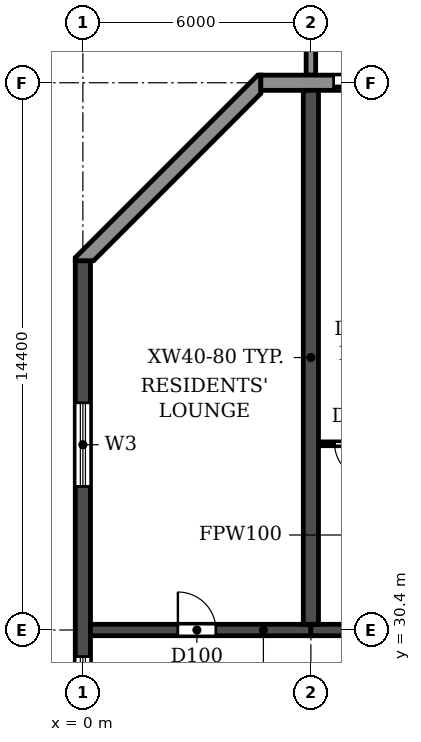
"""IFC4 building model, lengths in metres.
Left out: names, types, materials, properties, quantities, classifications, styles, units other than length and angle.
Written with IfcOpenShell. Run it as: python <this file> out.ifc"""

import sys

from ifc_helpers import new_model, si_unit, direction, frame, frame_2d, origin, place, context, subcontext, project, spatial, polyline, rectangle, outline, extrude, source, transform, mapped, element, fill, save


model = new_model("IFC4")
c1 = context("Model", 3, precision=1e-05, world=origin(), true_north=direction((0.0, 1.0)))
c2 = subcontext(c1, "Body", "Model", "MODEL_VIEW")
j1 = project(units=[si_unit("LENGTHUNIT", "METRE"), si_unit("PLANEANGLEUNIT", "RADIAN")], contexts=[c1])
p1 = place(None, origin())
s1 = spatial("IfcSite", under=j1, at=p1, CompositionType="ELEMENT")
p2 = place(p1, origin())
s2 = spatial("IfcBuilding", under=s1, at=p2, CompositionType="ELEMENT")
p3 = place(p2, frame((0.0, 0.0, 49.8)))
s3 = spatial("IfcBuildingStorey", under=s2, at=p3, CompositionType="ELEMENT", Elevation=49.8)
p4 = place(p3, frame((6.0, 30.55, 0.0), z_axis=(0.0, 0.0, 1.0), x_axis=(0.0, 1.0, 0.0)))
e1 = element("IfcWall", 1, at=p4, inside=s3, PredefinedType="SHEAR", context=c2, shape_type="SweptSolid", body=[
    extrude(rectangle(XDim=14.05, YDim=0.4, at=frame_2d((7.025, 0.0))), origin(), (0.0, 0.0, 1.0), 3.0),
])
p5 = place(p3, frame((0.0, 4.683, 0.0), z_axis=(0.0, 0.0, 1.0), x_axis=(0.0, 1.0, 0.0)))
e2 = element("IfcWall", 2, at=p5, inside=s3, PredefinedType="SHEAR", context=c2, shape_type="SweptSolid", body=[
    extrude(rectangle(XDim=35.434, YDim=0.4, at=frame_2d((17.717, 0.0))), origin(), (0.0, 0.0, 1.0), 3.0),
])
p6 = place(p5, frame((23.817, 0.0, 0.9)))
e3 = element("IfcOpeningElement", 3, at=p6, cuts=e2, PredefinedType="OPENING", context=c2, shape_type="SweptSolid", body=[
    extrude(rectangle(XDim=1.2, YDim=1.5, at=frame_2d((0.6, 0.75))), frame((0.0, 0.21, 0.0), z_axis=(0.0, -1.0, 0.0), x_axis=(1.0, 0.0, 0.0)), (0.0, 0.0, 1.0), 0.42),
])
p7 = place(p5, frame((8.017, 0.0, 0.9)))
e4 = element("IfcOpeningElement", 4, at=p7, cuts=e2, PredefinedType="OPENING", context=c2, shape_type="SweptSolid", body=[
    extrude(rectangle(XDim=1.2, YDim=1.5, at=frame_2d((0.6, 0.75))), frame((0.0, 0.21, 0.0), z_axis=(0.0, -1.0, 0.0), x_axis=(1.0, 0.0, 0.0)), (0.0, 0.0, 1.0), 0.42),
])
p8 = place(p5, frame((15.917, 0.0, 0.9)))
e5 = element("IfcOpeningElement", 5, at=p8, cuts=e2, PredefinedType="OPENING", context=c2, shape_type="SweptSolid", body=[
    extrude(rectangle(XDim=1.2, YDim=1.5, at=frame_2d((0.6, 0.75))), frame((0.0, 0.21, 0.0), z_axis=(0.0, -1.0, 0.0), x_axis=(1.0, 0.0, 0.0)), (0.0, 0.0, 1.0), 0.42),
])
p9 = place(p5, frame((29.493, 0.0, 0.6)))
e6 = element("IfcOpeningElement", 6, at=p9, cuts=e2, PredefinedType="OPENING", context=c2, shape_type="SweptSolid", body=[
    extrude(rectangle(XDim=2.2, YDim=1.8, at=frame_2d((1.1, 0.9))), frame((0.0, 0.21, 0.0), z_axis=(0.0, -1.0, 0.0), x_axis=(1.0, 0.0, 0.0)), (0.0, 0.0, 1.0), 0.42),
])
p10 = place(p5, frame((2.541, 0.0, 0.6)))
e7 = element("IfcOpeningElement", 7, at=p10, cuts=e2, PredefinedType="OPENING", context=c2, shape_type="SweptSolid", body=[
    extrude(rectangle(XDim=2.2, YDim=1.8, at=frame_2d((1.1, 0.9))), frame((0.0, 0.21, 0.0), z_axis=(0.0, -1.0, 0.0), x_axis=(1.0, 0.0, 0.0)), (0.0, 0.0, 1.0), 0.42),
])
p11 = place(p3, frame((0.2, 30.4, 0.0), z_axis=(0.0, 0.0, 1.0), x_axis=(1.0, 0.0, 0.0)))
e8 = element("IfcWall", 8, at=p11, inside=s3, PredefinedType="SHEAR", context=c2, shape_type="SweptSolid", body=[
    extrude(rectangle(XDim=5.8, YDim=0.3, at=frame_2d((2.9, 0.0))), origin(), (0.0, 0.0, 1.0), 2.4),
])
p12 = place(p11, frame((2.3, 0.0, 0.0)))
e9 = element("IfcOpeningElement", 9, at=p12, cuts=e8, PredefinedType="OPENING", context=c2, shape_type="SweptSolid", body=[
    extrude(rectangle(XDim=1.0, YDim=2.1, at=frame_2d((0.5, 1.05))), frame((0.0, 0.16, 0.0), z_axis=(0.0, -1.0, 0.0), x_axis=(1.0, 0.0, 0.0)), (0.0, 0.0, 1.0), 0.32),
])
p13 = place(p3, frame((6.0, 30.4, 0.0), z_axis=(0.0, 0.0, 1.0), x_axis=(1.0, 0.0, 0.0)))
e10 = element("IfcWall", 10, at=p13, inside=s3, PredefinedType="SHEAR", context=c2, shape_type="SweptSolid", body=[
    extrude(rectangle(XDim=6.0, YDim=0.3, at=frame_2d((3.0, 0.0))), origin(), (0.0, 0.0, 1.0), 2.4),
])
p14 = place(p13, frame((2.55, 0.0, 0.0)))
e11 = element("IfcOpeningElement", 11, at=p14, cuts=e10, PredefinedType="OPENING", context=c2, shape_type="SweptSolid", body=[
    extrude(rectangle(XDim=1.0, YDim=2.1, at=frame_2d((0.5, 1.05))), frame((0.0, 0.16, 0.0), z_axis=(0.0, -1.0, 0.0), x_axis=(1.0, 0.0, 0.0)), (0.0, 0.0, 1.0), 0.32),
])
p15 = place(p3, frame((97.317, 44.8, 0.0), z_axis=(0.0, 0.0, 1.0), x_axis=(-1.0, 0.0, 0.0)))
e12 = element("IfcWall", 12, at=p15, inside=s3, PredefinedType="STANDARD", context=c2, shape_type="SweptSolid", body=[
    extrude(rectangle(XDim=92.634, YDim=0.4, at=frame_2d((46.317, 0.0))), origin(), (0.0, 0.0, 1.0), 3.0),
])
p16 = place(p15, frame((88.917, 0.0, 0.0)))
e13 = element("IfcOpeningElement", 13, at=p16, cuts=e12, PredefinedType="OPENING", context=c2, shape_type="SweptSolid", body=[
    extrude(rectangle(XDim=1.8, YDim=2.4, at=frame_2d((0.9, 1.2))), frame((0.0, 0.21, 0.0), z_axis=(0.0, -1.0, 0.0), x_axis=(1.0, 0.0, 0.0)), (0.0, 0.0, 1.0), 0.42),
])
p17 = place(p15, frame((85.717, 0.0, 0.9)))
e14 = element("IfcOpeningElement", 14, at=p17, cuts=e12, PredefinedType="OPENING", context=c2, shape_type="SweptSolid", body=[
    extrude(rectangle(XDim=2.2, YDim=1.5, at=frame_2d((1.1, 0.75))), frame((0.0, 0.21, 0.0), z_axis=(0.0, -1.0, 0.0), x_axis=(1.0, 0.0, 0.0)), (0.0, 0.0, 1.0), 0.42),
])
p18 = place(p15, frame((82.717, 0.0, 0.9)))
e15 = element("IfcOpeningElement", 15, at=p18, cuts=e12, PredefinedType="OPENING", context=c2, shape_type="SweptSolid", body=[
    extrude(rectangle(XDim=2.2, YDim=1.5, at=frame_2d((1.1, 0.75))), frame((0.0, 0.21, 0.0), z_axis=(0.0, -1.0, 0.0), x_axis=(1.0, 0.0, 0.0)), (0.0, 0.0, 1.0), 0.42),
])
p19 = place(p15, frame((79.717, 0.0, 0.9)))
e16 = element("IfcOpeningElement", 16, at=p19, cuts=e12, PredefinedType="OPENING", context=c2, shape_type="SweptSolid", body=[
    extrude(rectangle(XDim=2.2, YDim=1.5, at=frame_2d((1.1, 0.75))), frame((0.0, 0.21, 0.0), z_axis=(0.0, -1.0, 0.0), x_axis=(1.0, 0.0, 0.0)), (0.0, 0.0, 1.0), 0.42),
])
p20 = place(p15, frame((76.717, 0.0, 0.9)))
e17 = element("IfcOpeningElement", 17, at=p20, cuts=e12, PredefinedType="OPENING", context=c2, shape_type="SweptSolid", body=[
    extrude(rectangle(XDim=2.2, YDim=1.5, at=frame_2d((1.1, 0.75))), frame((0.0, 0.21, 0.0), z_axis=(0.0, -1.0, 0.0), x_axis=(1.0, 0.0, 0.0)), (0.0, 0.0, 1.0), 0.42),
])
p21 = place(p15, frame((73.917, 0.0, 0.0)))
e18 = element("IfcOpeningElement", 18, at=p21, cuts=e12, PredefinedType="OPENING", context=c2, shape_type="SweptSolid", body=[
    extrude(rectangle(XDim=1.8, YDim=2.4, at=frame_2d((0.9, 1.2))), frame((0.0, 0.21, 0.0), z_axis=(0.0, -1.0, 0.0), x_axis=(1.0, 0.0, 0.0)), (0.0, 0.0, 1.0), 0.42),
])
p22 = place(p15, frame((70.717, 0.0, 0.9)))
e19 = element("IfcOpeningElement", 19, at=p22, cuts=e12, PredefinedType="OPENING", context=c2, shape_type="SweptSolid", body=[
    extrude(rectangle(XDim=2.2, YDim=1.5, at=frame_2d((1.1, 0.75))), frame((0.0, 0.21, 0.0), z_axis=(0.0, -1.0, 0.0), x_axis=(1.0, 0.0, 0.0)), (0.0, 0.0, 1.0), 0.42),
])
p23 = place(p15, frame((67.717, 0.0, 0.9)))
e20 = element("IfcOpeningElement", 20, at=p23, cuts=e12, PredefinedType="OPENING", context=c2, shape_type="SweptSolid", body=[
    extrude(rectangle(XDim=2.2, YDim=1.5, at=frame_2d((1.1, 0.75))), frame((0.0, 0.21, 0.0), z_axis=(0.0, -1.0, 0.0), x_axis=(1.0, 0.0, 0.0)), (0.0, 0.0, 1.0), 0.42),
])
p24 = place(p15, frame((64.717, 0.0, 0.9)))
e21 = element("IfcOpeningElement", 21, at=p24, cuts=e12, PredefinedType="OPENING", context=c2, shape_type="SweptSolid", body=[
    extrude(rectangle(XDim=2.2, YDim=1.5, at=frame_2d((1.1, 0.75))), frame((0.0, 0.21, 0.0), z_axis=(0.0, -1.0, 0.0), x_axis=(1.0, 0.0, 0.0)), (0.0, 0.0, 1.0), 0.42),
])
p25 = place(p15, frame((61.917, 0.0, 0.0)))
e22 = element("IfcOpeningElement", 22, at=p25, cuts=e12, PredefinedType="OPENING", context=c2, shape_type="SweptSolid", body=[
    extrude(rectangle(XDim=1.8, YDim=2.4, at=frame_2d((0.9, 1.2))), frame((0.0, 0.21, 0.0), z_axis=(0.0, -1.0, 0.0), x_axis=(1.0, 0.0, 0.0)), (0.0, 0.0, 1.0), 0.42),
])
p26 = place(p15, frame((58.717, 0.0, 0.9)))
e23 = element("IfcOpeningElement", 23, at=p26, cuts=e12, PredefinedType="OPENING", context=c2, shape_type="SweptSolid", body=[
    extrude(rectangle(XDim=2.2, YDim=1.5, at=frame_2d((1.1, 0.75))), frame((0.0, 0.21, 0.0), z_axis=(0.0, -1.0, 0.0), x_axis=(1.0, 0.0, 0.0)), (0.0, 0.0, 1.0), 0.42),
])
p27 = place(p15, frame((55.717, 0.0, 0.9)))
e24 = element("IfcOpeningElement", 24, at=p27, cuts=e12, PredefinedType="OPENING", context=c2, shape_type="SweptSolid", body=[
    extrude(rectangle(XDim=2.2, YDim=1.5, at=frame_2d((1.1, 0.75))), frame((0.0, 0.21, 0.0), z_axis=(0.0, -1.0, 0.0), x_axis=(1.0, 0.0, 0.0)), (0.0, 0.0, 1.0), 0.42),
])
p28 = place(p15, frame((52.717, 0.0, 0.9)))
e25 = element("IfcOpeningElement", 25, at=p28, cuts=e12, PredefinedType="OPENING", context=c2, shape_type="SweptSolid", body=[
    extrude(rectangle(XDim=2.2, YDim=1.5, at=frame_2d((1.1, 0.75))), frame((0.0, 0.21, 0.0), z_axis=(0.0, -1.0, 0.0), x_axis=(1.0, 0.0, 0.0)), (0.0, 0.0, 1.0), 0.42),
])
p29 = place(p15, frame((49.917, 0.0, 0.0)))
e26 = element("IfcOpeningElement", 26, at=p29, cuts=e12, PredefinedType="OPENING", context=c2, shape_type="SweptSolid", body=[
    extrude(rectangle(XDim=1.8, YDim=2.4, at=frame_2d((0.9, 1.2))), frame((0.0, 0.21, 0.0), z_axis=(0.0, -1.0, 0.0), x_axis=(1.0, 0.0, 0.0)), (0.0, 0.0, 1.0), 0.42),
])
p30 = place(p15, frame((46.717, 0.0, 0.9)))
e27 = element("IfcOpeningElement", 27, at=p30, cuts=e12, PredefinedType="OPENING", context=c2, shape_type="SweptSolid", body=[
    extrude(rectangle(XDim=2.2, YDim=1.5, at=frame_2d((1.1, 0.75))), frame((0.0, 0.21, 0.0), z_axis=(0.0, -1.0, 0.0), x_axis=(1.0, 0.0, 0.0)), (0.0, 0.0, 1.0), 0.42),
])
p31 = place(p15, frame((43.717, 0.0, 0.9)))
e28 = element("IfcOpeningElement", 28, at=p31, cuts=e12, PredefinedType="OPENING", context=c2, shape_type="SweptSolid", body=[
    extrude(rectangle(XDim=2.2, YDim=1.5, at=frame_2d((1.1, 0.75))), frame((0.0, 0.21, 0.0), z_axis=(0.0, -1.0, 0.0), x_axis=(1.0, 0.0, 0.0)), (0.0, 0.0, 1.0), 0.42),
])
p32 = place(p15, frame((40.717, 0.0, 0.9)))
e29 = element("IfcOpeningElement", 29, at=p32, cuts=e12, PredefinedType="OPENING", context=c2, shape_type="SweptSolid", body=[
    extrude(rectangle(XDim=2.2, YDim=1.5, at=frame_2d((1.1, 0.75))), frame((0.0, 0.21, 0.0), z_axis=(0.0, -1.0, 0.0), x_axis=(1.0, 0.0, 0.0)), (0.0, 0.0, 1.0), 0.42),
])
p33 = place(p15, frame((37.917, 0.0, 0.0)))
e30 = element("IfcOpeningElement", 30, at=p33, cuts=e12, PredefinedType="OPENING", context=c2, shape_type="SweptSolid", body=[
    extrude(rectangle(XDim=1.8, YDim=2.4, at=frame_2d((0.9, 1.2))), frame((0.0, 0.21, 0.0), z_axis=(0.0, -1.0, 0.0), x_axis=(1.0, 0.0, 0.0)), (0.0, 0.0, 1.0), 0.42),
])
p34 = place(p15, frame((34.717, 0.0, 0.9)))
e31 = element("IfcOpeningElement", 31, at=p34, cuts=e12, PredefinedType="OPENING", context=c2, shape_type="SweptSolid", body=[
    extrude(rectangle(XDim=2.2, YDim=1.5, at=frame_2d((1.1, 0.75))), frame((0.0, 0.21, 0.0), z_axis=(0.0, -1.0, 0.0), x_axis=(1.0, 0.0, 0.0)), (0.0, 0.0, 1.0), 0.42),
])
p35 = place(p15, frame((31.717, 0.0, 0.9)))
e32 = element("IfcOpeningElement", 32, at=p35, cuts=e12, PredefinedType="OPENING", context=c2, shape_type="SweptSolid", body=[
    extrude(rectangle(XDim=2.2, YDim=1.5, at=frame_2d((1.1, 0.75))), frame((0.0, 0.21, 0.0), z_axis=(0.0, -1.0, 0.0), x_axis=(1.0, 0.0, 0.0)), (0.0, 0.0, 1.0), 0.42),
])
p36 = place(p15, frame((28.717, 0.0, 0.9)))
e33 = element("IfcOpeningElement", 33, at=p36, cuts=e12, PredefinedType="OPENING", context=c2, shape_type="SweptSolid", body=[
    extrude(rectangle(XDim=2.2, YDim=1.5, at=frame_2d((1.1, 0.75))), frame((0.0, 0.21, 0.0), z_axis=(0.0, -1.0, 0.0), x_axis=(1.0, 0.0, 0.0)), (0.0, 0.0, 1.0), 0.42),
])
p37 = place(p15, frame((25.917, 0.0, 0.0)))
e34 = element("IfcOpeningElement", 34, at=p37, cuts=e12, PredefinedType="OPENING", context=c2, shape_type="SweptSolid", body=[
    extrude(rectangle(XDim=1.8, YDim=2.4, at=frame_2d((0.9, 1.2))), frame((0.0, 0.21, 0.0), z_axis=(0.0, -1.0, 0.0), x_axis=(1.0, 0.0, 0.0)), (0.0, 0.0, 1.0), 0.42),
])
p38 = place(p15, frame((22.917, 0.0, 0.0)))
e35 = element("IfcOpeningElement", 35, at=p38, cuts=e12, PredefinedType="OPENING", context=c2, shape_type="SweptSolid", body=[
    extrude(rectangle(XDim=1.8, YDim=2.4, at=frame_2d((0.9, 1.2))), frame((0.0, 0.21, 0.0), z_axis=(0.0, -1.0, 0.0), x_axis=(1.0, 0.0, 0.0)), (0.0, 0.0, 1.0), 0.42),
])
p39 = place(p15, frame((19.717, 0.0, 0.9)))
e36 = element("IfcOpeningElement", 36, at=p39, cuts=e12, PredefinedType="OPENING", context=c2, shape_type="SweptSolid", body=[
    extrude(rectangle(XDim=2.2, YDim=1.5, at=frame_2d((1.1, 0.75))), frame((0.0, 0.21, 0.0), z_axis=(0.0, -1.0, 0.0), x_axis=(1.0, 0.0, 0.0)), (0.0, 0.0, 1.0), 0.42),
])
p40 = place(p15, frame((16.717, 0.0, 0.9)))
e37 = element("IfcOpeningElement", 37, at=p40, cuts=e12, PredefinedType="OPENING", context=c2, shape_type="SweptSolid", body=[
    extrude(rectangle(XDim=2.2, YDim=1.5, at=frame_2d((1.1, 0.75))), frame((0.0, 0.21, 0.0), z_axis=(0.0, -1.0, 0.0), x_axis=(1.0, 0.0, 0.0)), (0.0, 0.0, 1.0), 0.42),
])
p41 = place(p15, frame((13.717, 0.0, 0.9)))
e38 = element("IfcOpeningElement", 38, at=p41, cuts=e12, PredefinedType="OPENING", context=c2, shape_type="SweptSolid", body=[
    extrude(rectangle(XDim=2.2, YDim=1.5, at=frame_2d((1.1, 0.75))), frame((0.0, 0.21, 0.0), z_axis=(0.0, -1.0, 0.0), x_axis=(1.0, 0.0, 0.0)), (0.0, 0.0, 1.0), 0.42),
])
p42 = place(p15, frame((10.717, 0.0, 0.9)))
e39 = element("IfcOpeningElement", 39, at=p42, cuts=e12, PredefinedType="OPENING", context=c2, shape_type="SweptSolid", body=[
    extrude(rectangle(XDim=2.2, YDim=1.5, at=frame_2d((1.1, 0.75))), frame((0.0, 0.21, 0.0), z_axis=(0.0, -1.0, 0.0), x_axis=(1.0, 0.0, 0.0)), (0.0, 0.0, 1.0), 0.42),
])
p43 = place(p15, frame((7.917, 0.0, 0.0)))
e40 = element("IfcOpeningElement", 40, at=p43, cuts=e12, PredefinedType="OPENING", context=c2, shape_type="SweptSolid", body=[
    extrude(rectangle(XDim=1.8, YDim=2.4, at=frame_2d((0.9, 1.2))), frame((0.0, 0.21, 0.0), z_axis=(0.0, -1.0, 0.0), x_axis=(1.0, 0.0, 0.0)), (0.0, 0.0, 1.0), 0.42),
])
p44 = place(p15, frame((4.717, 0.0, 0.9)))
e41 = element("IfcOpeningElement", 41, at=p44, cuts=e12, PredefinedType="OPENING", context=c2, shape_type="SweptSolid", body=[
    extrude(rectangle(XDim=2.2, YDim=1.5, at=frame_2d((1.1, 0.75))), frame((0.0, 0.21, 0.0), z_axis=(0.0, -1.0, 0.0), x_axis=(1.0, 0.0, 0.0)), (0.0, 0.0, 1.0), 0.42),
])
p45 = place(p15, frame((1.917, 0.0, 0.0)))
e42 = element("IfcOpeningElement", 42, at=p45, cuts=e12, PredefinedType="OPENING", context=c2, shape_type="SweptSolid", body=[
    extrude(rectangle(XDim=1.8, YDim=2.4, at=frame_2d((0.9, 1.2))), frame((0.0, 0.21, 0.0), z_axis=(0.0, -1.0, 0.0), x_axis=(1.0, 0.0, 0.0)), (0.0, 0.0, 1.0), 0.42),
])
p46 = place(p3, origin())
e43 = element("IfcWall", 43, at=p46, inside=s3, PredefinedType="STANDARD", context=c2, shape_type="SweptSolid", body=[
    extrude(outline(polyline([(4.683, 45.0), (4.6, 45.0), (-0.2, 40.2), (-0.2, 40.117), (0.283, 40.117), (4.683, 44.517), (4.683, 45.0)])), origin(), (0.0, 0.0, 1.0), 3.0),
])
m1 = source(origin(), c2, "Body", "SweptSolid", [
    extrude(outline(polyline([(0.0, 0.0), (0.25, 0.0), (0.25, 3.1), (0.0, 3.1), (0.0, 0.0)])), origin(), (0.0, 0.0, 1.0), 3.1),
])
p47 = place(p3, frame((5.875, 45.0, 0.0)))
e44 = element("IfcWall", 44, at=p47, inside=s3, PredefinedType="STANDARD", context=c2, shape_type="MappedRepresentation", body=[
    mapped(m1, transform((0.0, 0.0, 0.0))),
])
p48 = place(p3, frame((6.21, 35.3, 0.0), z_axis=(0.0, 0.0, 1.0), x_axis=(1.0, 0.0, 0.0)))
e45 = element("IfcWall", 45, at=p48, inside=s3, PredefinedType="PARTITIONING", context=c2, shape_type="SweptSolid", body=[
    extrude(rectangle(XDim=1.99, YDim=0.1, at=frame_2d((0.995, 0.0))), origin(), (0.0, 0.0, 1.0), 3.0),
])
p49 = place(p48, frame((0.415, 0.0, 0.0)))
e46 = element("IfcOpeningElement", 46, at=p49, cuts=e45, PredefinedType="OPENING", context=c2, shape_type="SweptSolid", body=[
    extrude(rectangle(XDim=0.9, YDim=2.1, at=frame_2d((0.45, 1.05))), frame((0.0, 0.06, 0.0), z_axis=(0.0, -1.0, 0.0), x_axis=(1.0, 0.0, 0.0)), (0.0, 0.0, 1.0), 0.12),
])
p50 = place(p16, origin())
e47 = element("IfcDoor", 47, at=p50, inside=s3, OperationType="DOUBLE_DOOR_SLIDING", PredefinedType="DOOR", context=c2, shape_type="SweptSolid", body=[
    extrude(rectangle(XDim=1.8, YDim=2.4, at=frame_2d((0.9, 1.2))), frame((0.0, 0.025, 0.0), z_axis=(0.0, -1.0, 0.0), x_axis=(1.0, 0.0, 0.0)), (0.0, 0.0, 1.0), 0.05),
])
fill(e13, e47)
p51 = place(p6, origin())
e48 = element("IfcWindow", 48, at=p51, inside=s3, PartitioningType="SINGLE_PANEL", PredefinedType="WINDOW", context=c2, shape_type="SweptSolid", body=[
    extrude(rectangle(XDim=1.2, YDim=1.5, at=frame_2d((0.6, 0.75))), frame((0.0, 0.03, 0.0), z_axis=(0.0, -1.0, 0.0), x_axis=(1.0, 0.0, 0.0)), (0.0, 0.0, 1.0), 0.06),
])
fill(e3, e48)
p52 = place(p9, origin())
e49 = element("IfcWindow", 49, at=p52, inside=s3, PartitioningType="DOUBLE_PANEL_HORIZONTAL", PredefinedType="WINDOW", context=c2, shape_type="SweptSolid", body=[
    extrude(rectangle(XDim=2.2, YDim=1.8, at=frame_2d((1.1, 0.9))), frame((0.0, 0.03, 0.0), z_axis=(0.0, -1.0, 0.0), x_axis=(1.0, 0.0, 0.0)), (0.0, 0.0, 1.0), 0.06),
])
fill(e6, e49)
p53 = place(p12, origin())
e50 = element("IfcDoor", 50, at=p53, inside=s3, OperationType="SINGLE_SWING_LEFT", PredefinedType="DOOR", context=c2, shape_type="SweptSolid", body=[
    extrude(rectangle(XDim=1.0, YDim=2.1, at=frame_2d((0.5, 1.05))), frame((0.0, 0.025, 0.0), z_axis=(0.0, -1.0, 0.0), x_axis=(1.0, 0.0, 0.0)), (0.0, 0.0, 1.0), 0.05),
])
fill(e9, e50)
p54 = place(p49, frame((0.9, 0.0, 0.0), z_axis=(0.0, 0.0, 1.0), x_axis=(-1.0, 0.0, 0.0)))
e51 = element("IfcDoor", 51, at=p54, inside=s3, OperationType="SINGLE_SWING_LEFT", PredefinedType="DOOR", context=c2, shape_type="SweptSolid", body=[
    extrude(rectangle(XDim=0.9, YDim=2.1, at=frame_2d((0.45, 1.05))), frame((0.0, 0.025, 0.0), z_axis=(0.0, -1.0, 0.0), x_axis=(1.0, 0.0, 0.0)), (0.0, 0.0, 1.0), 0.05),
])
fill(e46, e51)
save(model, sys.argv[1])
